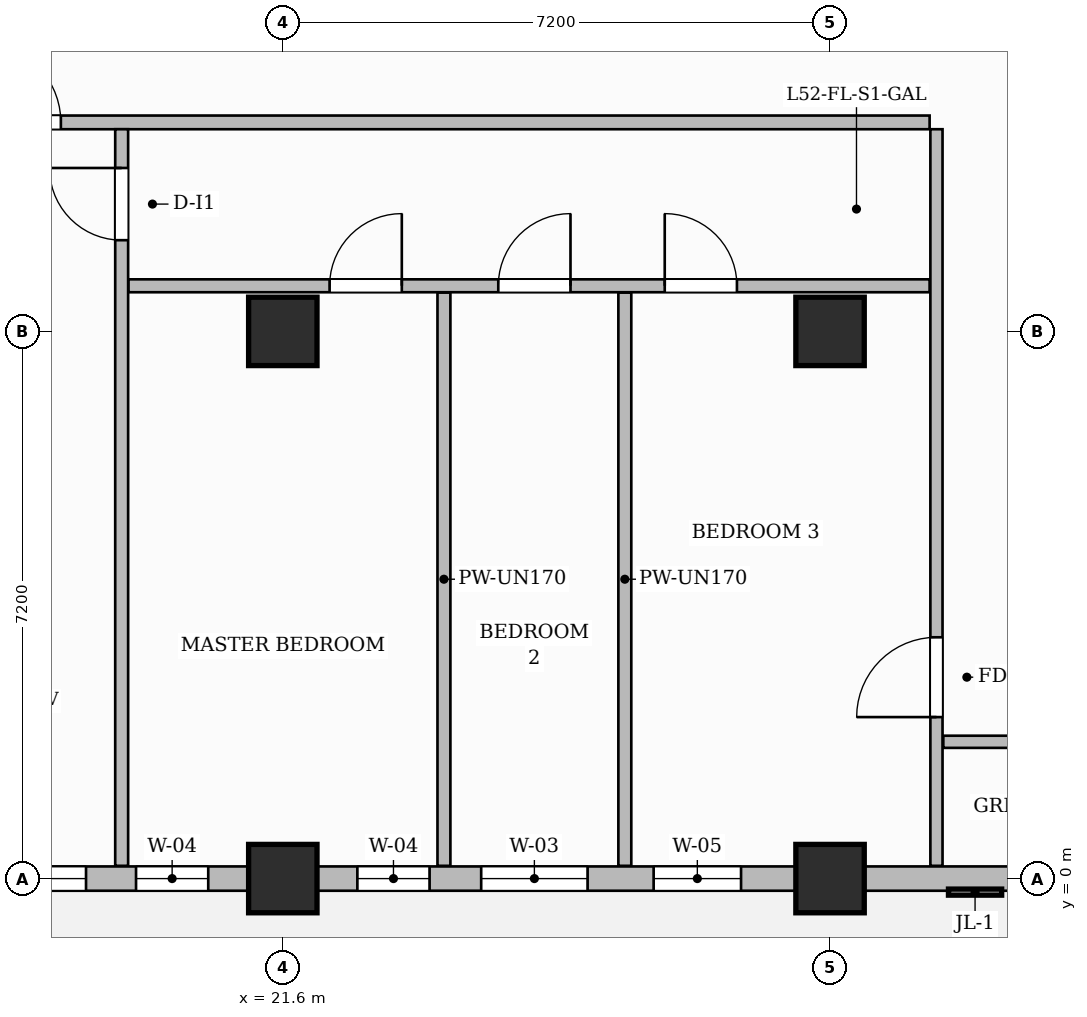
"""IFC4 building model, lengths in metres.
Left out: names, types, materials, properties, quantities, classifications, styles, units other than length and angle.
Written with IfcOpenShell. Run it as: python <this file> out.ifc"""

import sys

from ifc_helpers import new_model, si_unit, direction, frame, frame_2d, origin, origin_2d, place, context, subcontext, project, spatial, rectangle, extrude, source, transform, mapped, element, fill, save


model = new_model("IFC4")
c1 = context("Model", 3, precision=1e-05, world=origin(), true_north=direction((0.0, 1.0)))
c2 = subcontext(c1, "Body", "Model", "MODEL_VIEW")
j1 = project(units=[si_unit("LENGTHUNIT", "METRE"), si_unit("PLANEANGLEUNIT", "RADIAN")], contexts=[c1])
p1 = place(None, origin())
s1 = spatial("IfcSite", under=j1, at=p1, CompositionType="ELEMENT")
p2 = place(p1, origin())
s2 = spatial("IfcBuilding", under=s1, at=p2, CompositionType="ELEMENT")
p3 = place(p2, frame((0.0, 0.0, 209.6)))
s3 = spatial("IfcBuildingStorey", under=s2, at=p3, CompositionType="ELEMENT", Elevation=209.6)
m1 = source(origin(), c2, "Body", "SweptSolid", [
    extrude(rectangle(XDim=0.9, YDim=0.9, at=origin_2d()), origin(), (0.0, 0.0, 1.0), 3.85),
])
for number, where, z_axis, x_axis in (
    (1, (21.6, 0.0, 0.0), (0.0, 0.0, 1.0), (1.0, 0.0, 0.0)),
    (2, (21.6, 7.2, 0.0), (0.0, 0.0, 1.0), (1.0, 0.0, 0.0)),
    (3, (28.8, 0.0, 0.0), (0.0, 0.0, 1.0), (1.0, 0.0, 0.0)),
    (4, (28.8, 7.2, 0.0), (0.0, 0.0, 1.0), (1.0, 0.0, 0.0)),
):
    element("IfcColumn", number, at=place(p3, frame(where, z_axis=z_axis, x_axis=x_axis)), inside=s3, PredefinedType="COLUMN", context=c2, shape_type="MappedRepresentation", body=[
        mapped(m1, transform((0.0, 0.0, 0.0), scale=1.0)),
    ])
p4 = place(p3, frame((14.568, 9.95, 0.0), z_axis=(0.0, 0.0, 1.0), x_axis=(1.0, 0.0, 0.0)))
e5 = element("IfcWall", 5, at=p4, inside=s3, PredefinedType="PARTITIONING", context=c2, shape_type="SweptSolid", body=[
    extrude(rectangle(XDim=15.542, YDim=0.18, at=frame_2d((7.771, 0.0))), origin(), (0.0, 0.0, 1.0), 3.6),
])
p5 = place(p4, frame((3.062, 0.0, 0.0)))
e6 = element("IfcOpeningElement", 6, at=p5, cuts=e5, PredefinedType="OPENING", context=c2, shape_type="SweptSolid", body=[
    extrude(rectangle(XDim=1.05, YDim=2.25, at=frame_2d((0.525, 1.125))), frame((0.0, 0.1, 0.0), z_axis=(0.0, -1.0, 0.0), x_axis=(1.0, 0.0, 0.0)), (0.0, 0.0, 1.0), 0.2),
])
p6 = place(p3, frame((30.2, 0.168, 0.0), z_axis=(0.0, 0.0, 1.0), x_axis=(0.0, 1.0, 0.0)))
e7 = element("IfcWall", 7, at=p6, inside=s3, PredefinedType="PARTITIONING", context=c2, shape_type="SweptSolid", body=[
    extrude(rectangle(XDim=9.692, YDim=0.16, at=frame_2d((4.846, 0.0))), origin(), (0.0, 0.0, 1.0), 3.6),
])
p7 = place(p6, frame((1.957, 0.0, 0.0)))
e8 = element("IfcOpeningElement", 8, at=p7, cuts=e7, PredefinedType="OPENING", context=c2, shape_type="SweptSolid", body=[
    extrude(rectangle(XDim=1.05, YDim=2.15, at=frame_2d((0.525, 1.075))), frame((0.0, 0.09, 0.0), z_axis=(0.0, -1.0, 0.0), x_axis=(1.0, 0.0, 0.0)), (0.0, 0.0, 1.0), 0.18),
])
p8 = place(p3, frame((30.29, 1.8, 0.0), z_axis=(0.0, 0.0, 1.0), x_axis=(1.0, 0.0, 0.0)))
e9 = element("IfcWall", 9, at=p8, inside=s3, PredefinedType="PARTITIONING", context=c2, shape_type="SweptSolid", body=[
    extrude(rectangle(XDim=19.37, YDim=0.16, at=frame_2d((9.685, 0.0))), origin(), (0.0, 0.0, 1.0), 3.6),
])
p9 = place(p8, frame((3.054, 0.0, 0.0)))
e10 = element("IfcOpeningElement", 10, at=p9, cuts=e9, PredefinedType="OPENING", context=c2, shape_type="SweptSolid", body=[
    extrude(rectangle(XDim=0.9, YDim=2.15, at=frame_2d((0.45, 1.075))), frame((0.0, 0.09, 0.0), z_axis=(0.0, -1.0, 0.0), x_axis=(1.0, 0.0, 0.0)), (0.0, 0.0, 1.0), 0.18),
])
p10 = place(p8, frame((9.66, 0.0, 0.0)))
e11 = element("IfcOpeningElement", 11, at=p10, cuts=e9, PredefinedType="OPENING", context=c2, shape_type="SweptSolid", body=[
    extrude(rectangle(XDim=0.9, YDim=2.15, at=frame_2d((0.45, 1.075))), frame((0.0, 0.09, 0.0), z_axis=(0.0, -1.0, 0.0), x_axis=(1.0, 0.0, 0.0)), (0.0, 0.0, 1.0), 0.18),
])
p11 = place(p8, frame((15.86, 0.0, 0.0)))
e12 = element("IfcOpeningElement", 12, at=p11, cuts=e9, PredefinedType="OPENING", context=c2, shape_type="SweptSolid", body=[
    extrude(rectangle(XDim=0.9, YDim=2.15, at=frame_2d((0.45, 1.075))), frame((0.0, 0.09, 0.0), z_axis=(0.0, -1.0, 0.0), x_axis=(1.0, 0.0, 0.0)), (0.0, 0.0, 1.0), 0.18),
])
p12 = place(p3, frame((19.48, 0.168, 0.0), z_axis=(0.0, 0.0, 1.0), x_axis=(0.0, 1.0, 0.0)))
e13 = element("IfcWall", 13, at=p12, inside=s3, PredefinedType="PARTITIONING", context=c2, shape_type="SweptSolid", body=[
    extrude(rectangle(XDim=9.692, YDim=0.17, at=frame_2d((4.846, 0.0))), origin(), (0.0, 0.0, 1.0), 3.6),
])
p13 = place(p12, frame((8.232, 0.0, 0.0)))
e14 = element("IfcOpeningElement", 14, at=p13, cuts=e13, PredefinedType="OPENING", context=c2, shape_type="SweptSolid", body=[
    extrude(rectangle(XDim=0.95, YDim=2.15, at=frame_2d((0.475, 1.075))), frame((0.0, 0.095, 0.0), z_axis=(0.0, -1.0, 0.0), x_axis=(1.0, 0.0, 0.0)), (0.0, 0.0, 1.0), 0.19),
])
p14 = place(p3, frame((19.57, 7.8, 0.0), z_axis=(0.0, 0.0, 1.0), x_axis=(1.0, 0.0, 0.0)))
e15 = element("IfcWall", 15, at=p14, inside=s3, PredefinedType="PARTITIONING", context=c2, shape_type="SweptSolid", body=[
    extrude(rectangle(XDim=10.54, YDim=0.17, at=frame_2d((5.27, 0.0))), origin(), (0.0, 0.0, 1.0), 3.6),
])
p15 = place(p14, frame((2.646, 0.0, 0.0)))
e16 = element("IfcOpeningElement", 16, at=p15, cuts=e15, PredefinedType="OPENING", context=c2, shape_type="SweptSolid", body=[
    extrude(rectangle(XDim=0.95, YDim=2.15, at=frame_2d((0.475, 1.075))), frame((0.0, 0.095, 0.0), z_axis=(0.0, -1.0, 0.0), x_axis=(1.0, 0.0, 0.0)), (0.0, 0.0, 1.0), 0.19),
])
p16 = place(p14, frame((4.865, 0.0, 0.0)))
e17 = element("IfcOpeningElement", 17, at=p16, cuts=e15, PredefinedType="OPENING", context=c2, shape_type="SweptSolid", body=[
    extrude(rectangle(XDim=0.95, YDim=2.15, at=frame_2d((0.475, 1.075))), frame((0.0, 0.095, 0.0), z_axis=(0.0, -1.0, 0.0), x_axis=(1.0, 0.0, 0.0)), (0.0, 0.0, 1.0), 0.19),
])
p17 = place(p14, frame((7.055, 0.0, 0.0)))
e18 = element("IfcOpeningElement", 18, at=p17, cuts=e15, PredefinedType="OPENING", context=c2, shape_type="SweptSolid", body=[
    extrude(rectangle(XDim=0.95, YDim=2.15, at=frame_2d((0.475, 1.075))), frame((0.0, 0.095, 0.0), z_axis=(0.0, -1.0, 0.0), x_axis=(1.0, 0.0, 0.0)), (0.0, 0.0, 1.0), 0.19),
])
for number, where, z_axis, x_axis in (
    (19, (23.72, 0.168, 0.0), (0.0, 0.0, 1.0), (0.0, 1.0, 0.0)),
    (20, (26.1, 0.168, 0.0), (0.0, 0.0, 1.0), (0.0, 1.0, 0.0)),
):
    element("IfcWall", number, at=place(p3, frame(where, z_axis=z_axis, x_axis=x_axis)), inside=s3, PredefinedType="PARTITIONING", context=c2, shape_type="SweptSolid", body=[
        extrude(rectangle(XDim=7.542, YDim=0.17, at=frame_2d((3.771, 0.0))), origin(), (0.0, 0.0, 1.0), 3.6),
    ])
p18 = place(p3, frame((14.4, 0.0, 0.0), z_axis=(0.0, 0.0, 1.0), x_axis=(1.0, 0.0, 0.0)))
e21 = element("IfcWall", 21, at=p18, inside=s3, PredefinedType="SOLIDWALL", context=c2, shape_type="SweptSolid", body=[
    extrude(rectangle(XDim=35.4, YDim=0.32, at=frame_2d((17.7, 0.0))), origin(), (0.0, 0.0, 1.0), 3.085),
])
p19 = place(p18, frame((0.85, 0.0, 0.0)))
e22 = element("IfcOpeningElement", 22, at=p19, cuts=e21, PredefinedType="OPENING", context=c2, shape_type="SweptSolid", body=[
    extrude(rectangle(XDim=1.2, YDim=2.2, at=frame_2d((0.6, 1.1))), frame((0.0, 0.17, 0.0), z_axis=(0.0, -1.0, 0.0), x_axis=(1.0, 0.0, 0.0)), (0.0, 0.0, 1.0), 0.34),
])
p20 = place(p18, frame((2.811, 0.0, 0.8)))
e23 = element("IfcOpeningElement", 23, at=p20, cuts=e21, PredefinedType="OPENING", context=c2, shape_type="SweptSolid", body=[
    extrude(rectangle(XDim=1.8, YDim=1.85, at=frame_2d((0.9, 0.925))), frame((0.0, 0.17, 0.0), z_axis=(0.0, -1.0, 0.0), x_axis=(1.0, 0.0, 0.0)), (0.0, 0.0, 1.0), 0.34),
])
p21 = place(p18, frame((5.269, 0.0, 0.8)))
e24 = element("IfcOpeningElement", 24, at=p21, cuts=e21, PredefinedType="OPENING", context=c2, shape_type="SweptSolid", body=[
    extrude(rectangle(XDim=0.95, YDim=1.75, at=frame_2d((0.475, 0.875))), frame((0.0, 0.17, 0.0), z_axis=(0.0, -1.0, 0.0), x_axis=(1.0, 0.0, 0.0)), (0.0, 0.0, 1.0), 0.34),
])
p22 = place(p18, frame((8.181, 0.0, 0.8)))
e25 = element("IfcOpeningElement", 25, at=p22, cuts=e21, PredefinedType="OPENING", context=c2, shape_type="SweptSolid", body=[
    extrude(rectangle(XDim=0.95, YDim=1.75, at=frame_2d((0.475, 0.875))), frame((0.0, 0.17, 0.0), z_axis=(0.0, -1.0, 0.0), x_axis=(1.0, 0.0, 0.0)), (0.0, 0.0, 1.0), 0.34),
])
p23 = place(p18, frame((9.81, 0.0, 0.8)))
e26 = element("IfcOpeningElement", 26, at=p23, cuts=e21, PredefinedType="OPENING", context=c2, shape_type="SweptSolid", body=[
    extrude(rectangle(XDim=1.4, YDim=1.85, at=frame_2d((0.7, 0.925))), frame((0.0, 0.17, 0.0), z_axis=(0.0, -1.0, 0.0), x_axis=(1.0, 0.0, 0.0)), (0.0, 0.0, 1.0), 0.34),
])
p24 = place(p18, frame((12.079, 0.0, 0.8)))
e27 = element("IfcOpeningElement", 27, at=p24, cuts=e21, PredefinedType="OPENING", context=c2, shape_type="SweptSolid", body=[
    extrude(rectangle(XDim=1.15, YDim=1.8, at=frame_2d((0.575, 0.9))), frame((0.0, 0.17, 0.0), z_axis=(0.0, -1.0, 0.0), x_axis=(1.0, 0.0, 0.0)), (0.0, 0.0, 1.0), 0.34),
])
p25 = place(p18, frame((16.804, 0.0, 0.8)))
e28 = element("IfcOpeningElement", 28, at=p25, cuts=e21, PredefinedType="OPENING", context=c2, shape_type="SweptSolid", body=[
    extrude(rectangle(XDim=1.8, YDim=1.85, at=frame_2d((0.9, 0.925))), frame((0.0, 0.17, 0.0), z_axis=(0.0, -1.0, 0.0), x_axis=(1.0, 0.0, 0.0)), (0.0, 0.0, 1.0), 0.34),
])
p26 = place(p18, frame((21.521, 0.0, 0.8)))
e29 = element("IfcOpeningElement", 29, at=p26, cuts=e21, PredefinedType="OPENING", context=c2, shape_type="SweptSolid", body=[
    extrude(rectangle(XDim=0.95, YDim=1.75, at=frame_2d((0.475, 0.875))), frame((0.0, 0.17, 0.0), z_axis=(0.0, -1.0, 0.0), x_axis=(1.0, 0.0, 0.0)), (0.0, 0.0, 1.0), 0.34),
])
p27 = place(p18, frame((23.904, 0.0, 0.8)))
e30 = element("IfcOpeningElement", 30, at=p27, cuts=e21, PredefinedType="OPENING", context=c2, shape_type="SweptSolid", body=[
    extrude(rectangle(XDim=1.8, YDim=1.85, at=frame_2d((0.9, 0.925))), frame((0.0, 0.17, 0.0), z_axis=(0.0, -1.0, 0.0), x_axis=(1.0, 0.0, 0.0)), (0.0, 0.0, 1.0), 0.34),
])
p28 = place(p18, frame((29.681, 0.0, 0.8)))
e31 = element("IfcOpeningElement", 31, at=p28, cuts=e21, PredefinedType="OPENING", context=c2, shape_type="SweptSolid", body=[
    extrude(rectangle(XDim=1.8, YDim=1.85, at=frame_2d((0.9, 0.925))), frame((0.0, 0.17, 0.0), z_axis=(0.0, -1.0, 0.0), x_axis=(1.0, 0.0, 0.0)), (0.0, 0.0, 1.0), 0.34),
])
p29 = place(p18, frame((32.327, 0.0, 0.8)))
e32 = element("IfcOpeningElement", 32, at=p29, cuts=e21, PredefinedType="OPENING", context=c2, shape_type="SweptSolid", body=[
    extrude(rectangle(XDim=1.8, YDim=1.85, at=frame_2d((0.9, 0.925))), frame((0.0, 0.17, 0.0), z_axis=(0.0, -1.0, 0.0), x_axis=(1.0, 0.0, 0.0)), (0.0, 0.0, 1.0), 0.34),
])
m2 = source(origin(), c2, "Body", "SweptSolid", [
    extrude(rectangle(XDim=1.05, YDim=2.15, at=frame_2d((0.525, 1.075))), frame((0.0, 0.025, 0.0), z_axis=(0.0, -1.0, 0.0), x_axis=(1.0, 0.0, 0.0)), (0.0, 0.0, 1.0), 0.05),
])
p30 = place(p7, origin())
e33 = element("IfcDoor", 33, at=p30, inside=s3, OperationType="SINGLE_SWING_LEFT", PredefinedType="DOOR", context=c2, shape_type="MappedRepresentation", body=[
    mapped(m2, transform((0.0, 0.0, 0.0), scale=1.0)),
])
fill(e8, e33)
m3 = source(origin(), c2, "Body", "SweptSolid", [
    extrude(rectangle(XDim=1.05, YDim=2.25, at=frame_2d((0.525, 1.125))), frame((0.0, 0.025, 0.0), z_axis=(0.0, -1.0, 0.0), x_axis=(1.0, 0.0, 0.0)), (0.0, 0.0, 1.0), 0.05),
])
p31 = place(p5, origin())
e34 = element("IfcDoor", 34, at=p31, inside=s3, OperationType="SINGLE_SWING_LEFT", PredefinedType="DOOR", context=c2, shape_type="MappedRepresentation", body=[
    mapped(m3, transform((0.0, 0.0, 0.0), scale=1.0)),
])
fill(e6, e34)
m4 = source(origin(), c2, "Body", "SweptSolid", [
    extrude(rectangle(XDim=0.95, YDim=2.15, at=frame_2d((0.475, 1.075))), frame((0.0, 0.025, 0.0), z_axis=(0.0, -1.0, 0.0), x_axis=(1.0, 0.0, 0.0)), (0.0, 0.0, 1.0), 0.05),
])
p32 = place(p13, origin())
e35 = element("IfcDoor", 35, at=p32, inside=s3, OperationType="SINGLE_SWING_RIGHT", PredefinedType="DOOR", context=c2, shape_type="MappedRepresentation", body=[
    mapped(m4, transform((0.0, 0.0, 0.0), scale=1.0)),
])
fill(e14, e35)
p33 = place(p15, origin())
e36 = element("IfcDoor", 36, at=p33, inside=s3, OperationType="SINGLE_SWING_RIGHT", PredefinedType="DOOR", context=c2, shape_type="MappedRepresentation", body=[
    mapped(m4, transform((0.0, 0.0, 0.0), scale=1.0)),
])
fill(e16, e36)
p34 = place(p16, origin())
e37 = element("IfcDoor", 37, at=p34, inside=s3, OperationType="SINGLE_SWING_RIGHT", PredefinedType="DOOR", context=c2, shape_type="MappedRepresentation", body=[
    mapped(m4, transform((0.0, 0.0, 0.0), scale=1.0)),
])
fill(e17, e37)
p35 = place(p17, origin())
e38 = element("IfcDoor", 38, at=p35, inside=s3, OperationType="SINGLE_SWING_LEFT", PredefinedType="DOOR", context=c2, shape_type="MappedRepresentation", body=[
    mapped(m4, transform((0.0, 0.0, 0.0), scale=1.0)),
])
fill(e18, e38)
m5 = source(origin(), c2, "Body", "SweptSolid", [
    extrude(rectangle(XDim=1.8, YDim=1.85, at=frame_2d((0.9, 0.925))), frame((0.0, 0.03, 0.0), z_axis=(0.0, -1.0, 0.0), x_axis=(1.0, 0.0, 0.0)), (0.0, 0.0, 1.0), 0.06),
])
p36 = place(p20, origin())
e39 = element("IfcWindow", 39, at=p36, inside=s3, PartitioningType="DOUBLE_PANEL_VERTICAL", PredefinedType="WINDOW", context=c2, shape_type="MappedRepresentation", body=[
    mapped(m5, transform((0.0, 0.0, 0.0), scale=1.0)),
])
fill(e23, e39)
m6 = source(origin(), c2, "Body", "SweptSolid", [
    extrude(rectangle(XDim=0.95, YDim=1.75, at=frame_2d((0.475, 0.875))), frame((0.0, 0.03, 0.0), z_axis=(0.0, -1.0, 0.0), x_axis=(1.0, 0.0, 0.0)), (0.0, 0.0, 1.0), 0.06),
])
p37 = place(p21, origin())
e40 = element("IfcWindow", 40, at=p37, inside=s3, PartitioningType="SINGLE_PANEL", PredefinedType="WINDOW", context=c2, shape_type="MappedRepresentation", body=[
    mapped(m6, transform((0.0, 0.0, 0.0), scale=1.0)),
])
fill(e24, e40)
p38 = place(p22, origin())
e41 = element("IfcWindow", 41, at=p38, inside=s3, PartitioningType="SINGLE_PANEL", PredefinedType="WINDOW", context=c2, shape_type="MappedRepresentation", body=[
    mapped(m6, transform((0.0, 0.0, 0.0), scale=1.0)),
])
fill(e25, e41)
m7 = source(origin(), c2, "Body", "SweptSolid", [
    extrude(rectangle(XDim=1.4, YDim=1.85, at=frame_2d((0.7, 0.925))), frame((0.0, 0.03, 0.0), z_axis=(0.0, -1.0, 0.0), x_axis=(1.0, 0.0, 0.0)), (0.0, 0.0, 1.0), 0.06),
])
p39 = place(p23, origin())
e42 = element("IfcWindow", 42, at=p39, inside=s3, PartitioningType="SINGLE_PANEL", PredefinedType="WINDOW", context=c2, shape_type="MappedRepresentation", body=[
    mapped(m7, transform((0.0, 0.0, 0.0), scale=1.0)),
])
fill(e26, e42)
m8 = source(origin(), c2, "Body", "SweptSolid", [
    extrude(rectangle(XDim=1.15, YDim=1.8, at=frame_2d((0.575, 0.9))), frame((0.0, 0.03, 0.0), z_axis=(0.0, -1.0, 0.0), x_axis=(1.0, 0.0, 0.0)), (0.0, 0.0, 1.0), 0.06),
])
p40 = place(p24, origin())
e43 = element("IfcWindow", 43, at=p40, inside=s3, PartitioningType="SINGLE_PANEL", PredefinedType="WINDOW", context=c2, shape_type="MappedRepresentation", body=[
    mapped(m8, transform((0.0, 0.0, 0.0), scale=1.0)),
])
fill(e27, e43)
save(model, sys.argv[1])
